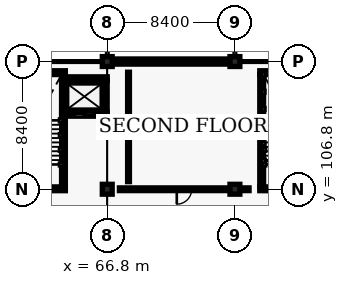
"""IFC4 building model, lengths in metres.
Left out: names, types, materials, properties, quantities, classifications, styles, units other than length and angle.
Written with IfcOpenShell. Run it as: python <this file> out.ifc"""

import sys

from ifc_helpers import new_model, si_unit, direction, frame, frame_2d, origin, origin_2d, place, context, subcontext, project, spatial, rectangle, extrude, element, fill, save


model = new_model("IFC4")
c1 = context("Model", 3, precision=1e-05, world=origin(), true_north=direction((0.0, 1.0)))
c2 = subcontext(c1, "Body", "Model", "MODEL_VIEW")
j1 = project(units=[si_unit("LENGTHUNIT", "METRE"), si_unit("PLANEANGLEUNIT", "RADIAN")], contexts=[c1])
p1 = place(None, origin())
s1 = spatial("IfcSite", under=j1, at=p1, CompositionType="ELEMENT")
p2 = place(p1, origin())
s2 = spatial("IfcBuilding", under=s1, at=p2, CompositionType="ELEMENT")
p3 = place(p2, frame((0.0, 0.0, 9.0)))
s3 = spatial("IfcBuildingStorey", under=s2, at=p3, CompositionType="ELEMENT", Elevation=9.0)
for number, where, z_axis, x_axis in (
    (1, (66.8, 106.8, 0.0), (0.0, 0.0, 1.0), (1.0, 0.0, 0.0)),
    (2, (66.8, 115.2, 0.0), (0.0, 0.0, 1.0), (1.0, 0.0, 0.0)),
    (3, (75.2, 106.8, 0.0), (0.0, 0.0, 1.0), (1.0, 0.0, 0.0)),
    (4, (75.2, 115.2, 0.0), (0.0, 0.0, 1.0), (1.0, 0.0, 0.0)),
):
    element("IfcColumn", number, at=place(p3, frame(where, z_axis=z_axis, x_axis=x_axis)), inside=s3, PredefinedType="COLUMN", context=c2, shape_type="SweptSolid", body=[
        extrude(rectangle(XDim=0.65, YDim=0.65, at=origin_2d()), origin(), (0.0, 0.0, 1.0), 3.9),
    ])
p4 = place(p3, frame((66.9, 115.2, 0.0), z_axis=(0.0, 0.0, 1.0), x_axis=(1.0, 0.0, 0.0)))
e5 = element("IfcWall", 5, at=p4, inside=s3, PredefinedType="SOLIDWALL", context=c2, shape_type="SweptSolid", body=[
    extrude(rectangle(XDim=8.2, YDim=0.34, at=frame_2d((4.1, 0.0))), origin(), (0.0, 0.0, 1.0), 2.845),
])
p5 = place(p3, frame((64.045, 106.83, 0.0), z_axis=(0.0, 0.0, 1.0), x_axis=(-1.0, 0.0, 0.0)))
e6 = element("IfcWall", 6, at=p5, inside=s3, PredefinedType="SHEAR", context=c2, shape_type="SweptSolid", body=[
    extrude(rectangle(XDim=3.61, YDim=0.25, at=frame_2d((1.805, 0.0))), origin(), (0.0, 0.0, 1.0), 3.66),
])
p6 = place(p5, frame((1.205, 0.0, 0.0)))
e7 = element("IfcOpeningElement", 7, at=p6, cuts=e6, PredefinedType="OPENING", context=c2, shape_type="SweptSolid", body=[
    extrude(rectangle(XDim=1.2, YDim=2.15, at=frame_2d((0.6, 1.075))), frame((0.0, 0.135, 0.0), z_axis=(0.0, -1.0, 0.0), x_axis=(1.0, 0.0, 0.0)), (0.0, 0.0, 1.0), 0.27),
])
p7 = place(p3, frame((60.435, 114.47, 0.0), z_axis=(0.0, 0.0, 1.0), x_axis=(1.0, 0.0, 0.0)))
e8 = element("IfcWall", 8, at=p7, inside=s3, PredefinedType="SHEAR", context=c2, shape_type="SweptSolid", body=[
    extrude(rectangle(XDim=3.61, YDim=0.25, at=frame_2d((1.805, 0.0))), origin(), (0.0, 0.0, 1.0), 3.66),
])
p8 = place(p3, frame((63.92, 114.345, 0.0), z_axis=(0.0, 0.0, 1.0), x_axis=(0.0, -1.0, 0.0)))
e9 = element("IfcWall", 9, at=p8, inside=s3, PredefinedType="SHEAR", context=c2, shape_type="SweptSolid", body=[
    extrude(rectangle(XDim=7.39, YDim=0.25, at=frame_2d((3.695, 0.0))), origin(), (0.0, 0.0, 1.0), 3.66),
])
p9 = place(p3, frame((63.8, 111.73, 0.0), z_axis=(0.0, 0.0, 1.0), x_axis=(1.0, 0.0, 0.0)))
e10 = element("IfcWall", 10, at=p9, inside=s3, PredefinedType="SHEAR", context=c2, shape_type="SweptSolid", body=[
    extrude(rectangle(XDim=3.0, YDim=0.25, at=frame_2d((1.5, 0.0))), origin(), (0.0, 0.0, 1.0), 3.66),
])
p10 = place(p9, frame((0.89, 0.0, 0.0)))
e11 = element("IfcOpeningElement", 11, at=p10, cuts=e10, PredefinedType="OPENING", context=c2, shape_type="SweptSolid", body=[
    extrude(rectangle(XDim=1.22, YDim=2.18, at=frame_2d((0.61, 1.09))), frame((0.0, 0.135, 0.0), z_axis=(0.0, -1.0, 0.0), x_axis=(1.0, 0.0, 0.0)), (0.0, 0.0, 1.0), 0.27),
])
p11 = place(p3, frame((66.8, 114.07, 0.0), z_axis=(0.0, 0.0, 1.0), x_axis=(-1.0, 0.0, 0.0)))
e12 = element("IfcWall", 12, at=p11, inside=s3, PredefinedType="SHEAR", context=c2, shape_type="SweptSolid", body=[
    extrude(rectangle(XDim=3.0, YDim=0.25, at=frame_2d((1.5, 0.0))), origin(), (0.0, 0.0, 1.0), 3.66),
])
p12 = place(p3, frame((66.67, 111.86, 0.0), z_axis=(0.0, 0.0, 1.0), x_axis=(0.0, 1.0, 0.0)))
e13 = element("IfcWall", 13, at=p12, inside=s3, PredefinedType="SHEAR", context=c2, shape_type="SweptSolid", body=[
    extrude(rectangle(XDim=2.08, YDim=0.25, at=frame_2d((1.04, 0.0))), origin(), (0.0, 0.0, 1.0), 3.66),
])
p13 = place(p3, frame((80.445, 106.83, 0.0), z_axis=(0.0, 0.0, 1.0), x_axis=(-1.0, 0.0, 0.0)))
e14 = element("IfcWall", 14, at=p13, inside=s3, PredefinedType="SHEAR", context=c2, shape_type="SweptSolid", body=[
    extrude(rectangle(XDim=3.61, YDim=0.25, at=frame_2d((1.805, 0.0))), origin(), (0.0, 0.0, 1.0), 3.66),
])
p14 = place(p13, frame((1.235, 0.0, 0.0)))
e15 = element("IfcOpeningElement", 15, at=p14, cuts=e14, PredefinedType="OPENING", context=c2, shape_type="SweptSolid", body=[
    extrude(rectangle(XDim=1.14, YDim=2.15, at=frame_2d((0.57, 1.075))), frame((0.0, 0.135, 0.0), z_axis=(0.0, -1.0, 0.0), x_axis=(1.0, 0.0, 0.0)), (0.0, 0.0, 1.0), 0.27),
])
p15 = place(p3, frame((76.835, 114.47, 0.0), z_axis=(0.0, 0.0, 1.0), x_axis=(1.0, 0.0, 0.0)))
e16 = element("IfcWall", 16, at=p15, inside=s3, PredefinedType="SHEAR", context=c2, shape_type="SweptSolid", body=[
    extrude(rectangle(XDim=3.61, YDim=0.25, at=frame_2d((1.805, 0.0))), origin(), (0.0, 0.0, 1.0), 3.66),
])
p16 = place(p3, frame((76.96, 106.955, 0.0), z_axis=(0.0, 0.0, 1.0), x_axis=(0.0, 1.0, 0.0)))
e17 = element("IfcWall", 17, at=p16, inside=s3, PredefinedType="SHEAR", context=c2, shape_type="SweptSolid", body=[
    extrude(rectangle(XDim=7.39, YDim=0.25, at=frame_2d((3.695, 0.0))), origin(), (0.0, 0.0, 1.0), 3.66),
])
p17 = place(p3, frame((67.6, 106.8, 0.0), z_axis=(0.0, 0.0, 1.0), x_axis=(1.0, 0.0, 0.0)))
e18 = element("IfcWall", 18, at=p17, inside=s3, PredefinedType="PARTITIONING", context=c2, shape_type="SweptSolid", body=[
    extrude(rectangle(XDim=8.53, YDim=0.18, at=frame_2d((4.265, 0.0))), origin(), (0.0, 0.0, 1.0), 2.845),
])
p18 = place(p17, frame((3.775, 0.0, 0.0)))
e19 = element("IfcOpeningElement", 19, at=p18, cuts=e18, PredefinedType="OPENING", context=c2, shape_type="SweptSolid", body=[
    extrude(rectangle(XDim=0.98, YDim=2.12, at=frame_2d((0.49, 1.06))), frame((0.0, 0.1, 0.0), z_axis=(0.0, -1.0, 0.0), x_axis=(1.0, 0.0, 0.0)), (0.0, 0.0, 1.0), 0.2),
])
p19 = place(p3, frame((68.2, 107.3, 0.0), z_axis=(0.0, 0.0, 1.0), x_axis=(0.0, 1.0, 0.0)))
e20 = element("IfcWall", 20, at=p19, inside=s3, PredefinedType="PARTITIONING", context=c2, shape_type="SweptSolid", body=[
    extrude(rectangle(XDim=7.2, YDim=0.12, at=frame_2d((3.6, 0.0))), origin(), (0.0, 0.0, 1.0), 3.645),
])
p20 = place(p19, frame((2.92, 0.0, 0.0)))
e21 = element("IfcOpeningElement", 21, at=p20, cuts=e20, PredefinedType="OPENING", context=c2, shape_type="SweptSolid", body=[
    extrude(rectangle(XDim=1.36, YDim=2.22, at=frame_2d((0.68, 1.11))), frame((0.0, 0.07, 0.0), z_axis=(0.0, -1.0, 0.0), x_axis=(1.0, 0.0, 0.0)), (0.0, 0.0, 1.0), 0.14),
])
p21 = place(p10, origin())
e22 = element("IfcDoor", 22, at=p21, inside=s3, OperationType="SLIDING_TO_RIGHT", PredefinedType="DOOR", context=c2, shape_type="SweptSolid", body=[
    extrude(rectangle(XDim=1.22, YDim=2.18, at=frame_2d((0.61, 1.09))), frame((0.0, 0.025, 0.0), z_axis=(0.0, -1.0, 0.0), x_axis=(1.0, 0.0, 0.0)), (0.0, 0.0, 1.0), 0.05),
])
fill(e11, e22)
p22 = place(p18, origin())
e23 = element("IfcDoor", 23, at=p22, inside=s3, OperationType="SINGLE_SWING_RIGHT", PredefinedType="DOOR", context=c2, shape_type="SweptSolid", body=[
    extrude(rectangle(XDim=0.98, YDim=2.12, at=frame_2d((0.49, 1.06))), frame((0.0, 0.025, 0.0), z_axis=(0.0, -1.0, 0.0), x_axis=(1.0, 0.0, 0.0)), (0.0, 0.0, 1.0), 0.05),
])
fill(e19, e23)
p23 = place(p20, origin())
e24 = element("IfcDoor", 24, at=p23, inside=s3, OperationType="DOUBLE_DOOR_SINGLE_SWING", PredefinedType="DOOR", context=c2, shape_type="SweptSolid", body=[
    extrude(rectangle(XDim=1.36, YDim=2.22, at=frame_2d((0.68, 1.11))), frame((0.0, 0.025, 0.0), z_axis=(0.0, -1.0, 0.0), x_axis=(1.0, 0.0, 0.0)), (0.0, 0.0, 1.0), 0.05),
])
fill(e21, e24)
save(model, sys.argv[1])
